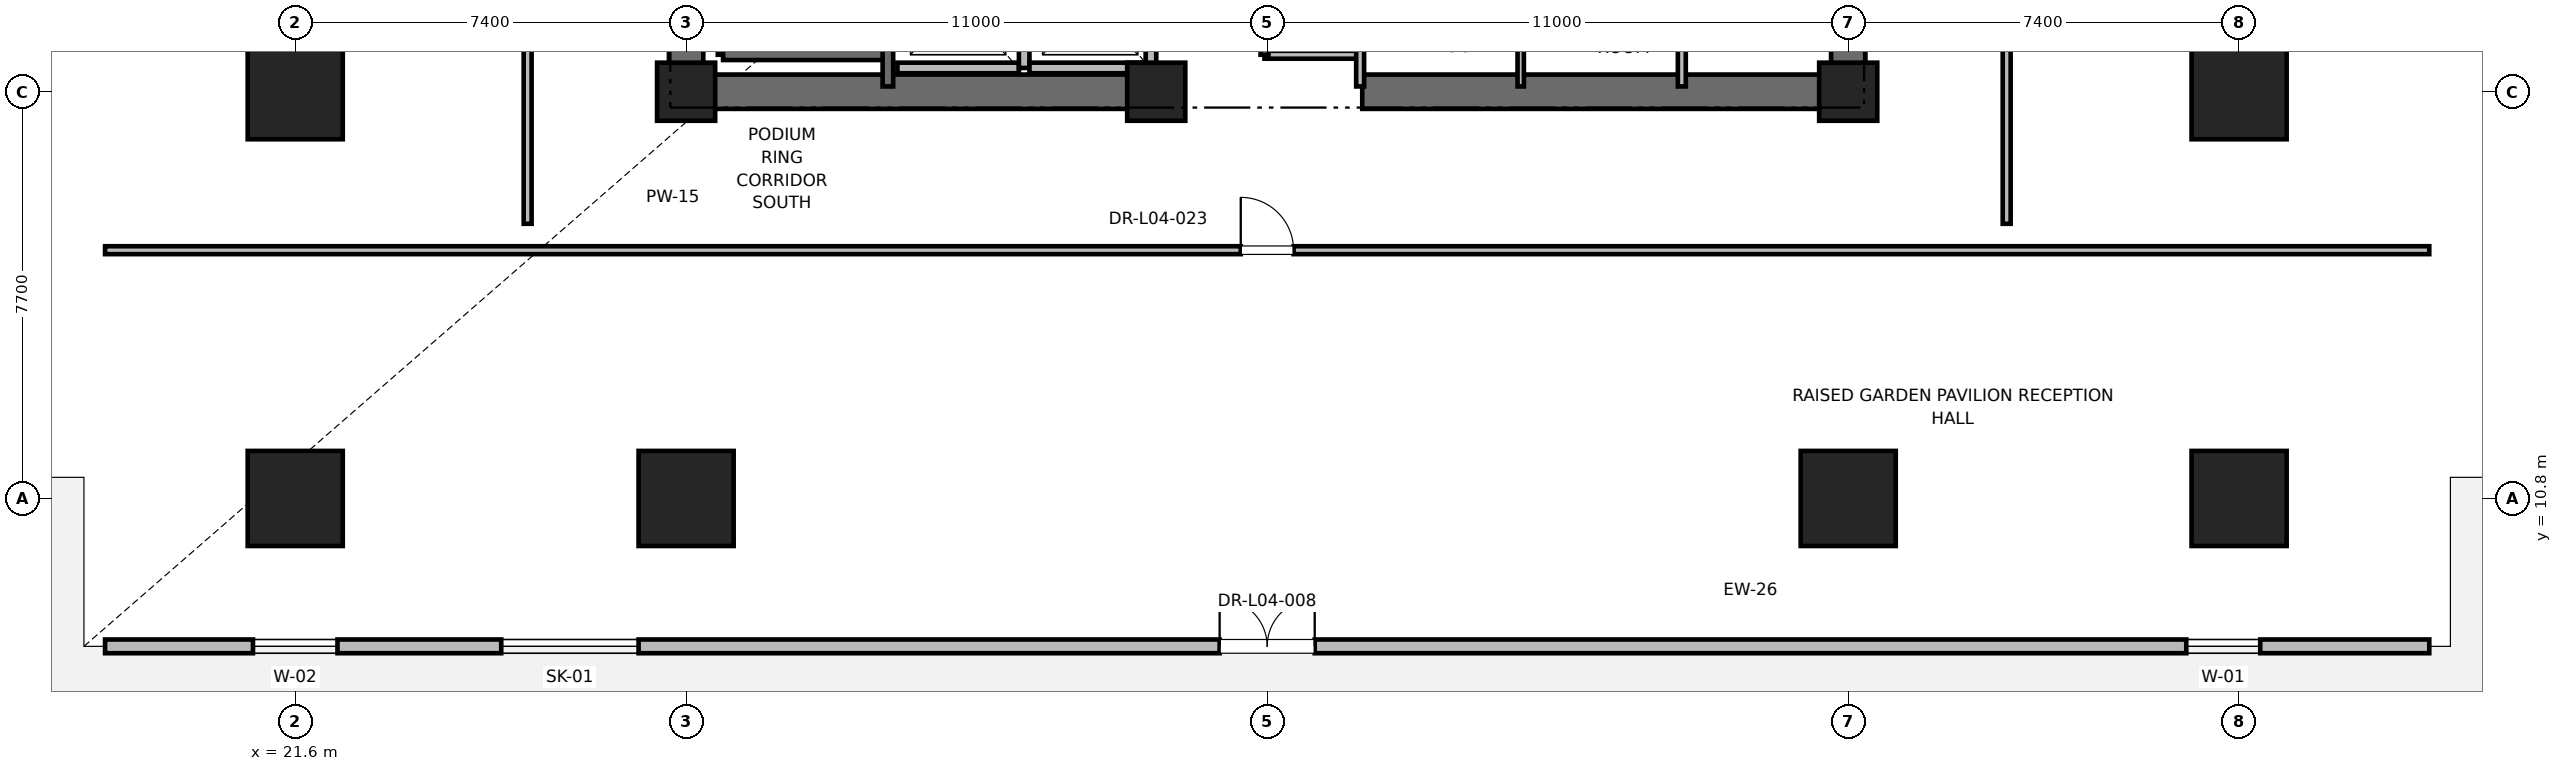
"""IFC4 building model, lengths in metres.
Left out: names, types, materials, properties, quantities, classifications, styles, units other than length and angle.
Written with IfcOpenShell. Run it as: python <this file> out.ifc"""

import sys

from ifc_helpers import new_model, si_unit, direction, frame, frame_2d, origin, origin_2d, place, context, subcontext, project, spatial, rectangle, extrude, element, fill, save


model = new_model("IFC4")
c1 = context("Model", 3, precision=1e-05, world=origin(), true_north=direction((0.0, 1.0)))
c2 = subcontext(c1, "Body", "Model", "MODEL_VIEW")
j1 = project(units=[si_unit("LENGTHUNIT", "METRE"), si_unit("PLANEANGLEUNIT", "RADIAN")], contexts=[c1])
p1 = place(None, origin())
s1 = spatial("IfcSite", under=j1, at=p1, CompositionType="ELEMENT")
p2 = place(p1, origin())
s2 = spatial("IfcBuilding", under=s1, at=p2, CompositionType="ELEMENT")
p3 = place(p2, frame((0.0, 0.0, 21.6)))
s3 = spatial("IfcBuildingStorey", under=s2, at=p3, CompositionType="ELEMENT", Elevation=21.6)
for number, where, z_axis, x_axis in (
    (1, (29.0, 10.8, 0.0), (0.0, 0.0, 1.0), (1.0, 0.0, 0.0)),
    (2, (51.0, 10.8, 0.0), (0.0, 0.0, 1.0), (1.0, 0.0, 0.0)),
    (3, (21.6, 18.5, 0.0), (0.0, 0.0, 1.0), (1.0, 0.0, 0.0)),
    (4, (58.4, 18.5, 0.0), (0.0, 0.0, 1.0), (1.0, 0.0, 0.0)),
    (5, (21.6, 10.8, 0.0), (0.0, 0.0, 1.0), (1.0, 0.0, 0.0)),
    (6, (58.4, 10.8, 0.0), (0.0, 0.0, 1.0), (1.0, 0.0, 0.0)),
):
    element("IfcColumn", number, at=place(p3, frame(where, z_axis=z_axis, x_axis=x_axis)), inside=s3, PredefinedType="COLUMN", context=c2, shape_type="SweptSolid", body=[
        extrude(rectangle(XDim=1.8, YDim=1.8, at=origin_2d()), origin(), (0.0, 0.0, 1.0), 6.0),
    ])
for number, where, z_axis, x_axis in (
    (7, (29.0, 18.5, 0.0), (0.0, 0.0, 1.0), (1.0, 0.0, 0.0)),
    (8, (51.0, 18.5, 0.0), (0.0, 0.0, 1.0), (1.0, 0.0, 0.0)),
    (9, (37.9, 18.5, 0.0), (0.0, 0.0, 1.0), (1.0, 0.0, 0.0)),
):
    element("IfcColumn", number, at=place(p3, frame(where, z_axis=z_axis, x_axis=x_axis)), inside=s3, PredefinedType="PILASTER", context=c2, shape_type="SweptSolid", body=[
        extrude(rectangle(XDim=1.1, YDim=1.1, at=origin_2d()), origin(), (0.0, 0.0, 1.0), 6.0),
    ])
for number, where, z_axis, x_axis in (
    (10, (29.0, 18.5, 0.0), (0.0, 0.0, 1.0), (1.0, 0.0, 0.0)),
    (11, (41.8, 18.5, 0.0), (0.0, 0.0, 1.0), (1.0, 0.0, 0.0)),
):
    element("IfcWall", number, at=place(p3, frame(where, z_axis=z_axis, x_axis=x_axis)), inside=s3, PredefinedType="SHEAR", context=c2, shape_type="SweptSolid", body=[
        extrude(rectangle(XDim=9.2, YDim=0.65, at=frame_2d((4.6, 0.0))), origin(), (0.0, 0.0, 1.0), 5.76),
    ])
p4 = place(p3, frame((29.0, 18.5, 0.0), z_axis=(0.0, 0.0, 1.0), x_axis=(0.0, 1.0, 0.0)))
e12 = element("IfcWall", 12, at=p4, inside=s3, PredefinedType="SHEAR", context=c2, shape_type="SweptSolid", body=[
    extrude(rectangle(XDim=8.8, YDim=0.65, at=frame_2d((4.4, 0.0))), origin(), (0.0, 0.0, 1.0), 5.76),
])
p5 = place(p3, frame((51.0, 18.5, 0.0), z_axis=(0.0, 0.0, 1.0), x_axis=(0.0, 1.0, 0.0)))
e13 = element("IfcWall", 13, at=p5, inside=s3, PredefinedType="SHEAR", context=c2, shape_type="SweptSolid", body=[
    extrude(rectangle(XDim=5.8, YDim=0.65, at=frame_2d((2.9, 0.0))), origin(), (0.0, 0.0, 1.0), 5.76),
])
p6 = place(p3, frame((18.0, 8.0, 0.0), z_axis=(0.0, 0.0, 1.0), x_axis=(1.0, 0.0, 0.0)))
e14 = element("IfcWall", 14, at=p6, inside=s3, PredefinedType="PARAPET", context=c2, shape_type="SweptSolid", body=[
    extrude(rectangle(XDim=44.0, YDim=0.26, at=frame_2d((22.0, 0.0))), origin(), (0.0, 0.0, 1.0), 4.889),
])
p7 = place(p6, frame((2.8, 0.0, 0.9)))
e15 = element("IfcOpeningElement", 15, at=p7, cuts=e14, PredefinedType="OPENING", context=c2, shape_type="SweptSolid", body=[
    extrude(rectangle(XDim=1.6, YDim=2.1, at=frame_2d((0.8, 1.05))), frame((0.0, 0.13, 0.0), z_axis=(0.0, -1.0, 0.0), x_axis=(1.0, 0.0, 0.0)), (0.0, 0.0, 1.0), 0.26),
])
p8 = place(p6, frame((7.5, 0.0, 2.85)))
e16 = element("IfcOpeningElement", 16, at=p8, cuts=e14, PredefinedType="OPENING", context=c2, shape_type="SweptSolid", body=[
    extrude(rectangle(XDim=2.6, YDim=1.4, at=frame_2d((1.3, 0.7))), frame((0.0, 0.13, 0.0), z_axis=(0.0, -1.0, 0.0), x_axis=(1.0, 0.0, 0.0)), (0.0, 0.0, 1.0), 0.26),
])
p9 = place(p6, frame((21.1, 0.0, 0.0)))
e17 = element("IfcOpeningElement", 17, at=p9, cuts=e14, PredefinedType="OPENING", context=c2, shape_type="SweptSolid", body=[
    extrude(rectangle(XDim=1.8, YDim=2.4, at=frame_2d((0.9, 1.2))), frame((0.0, 0.13, 0.0), z_axis=(0.0, -1.0, 0.0), x_axis=(1.0, 0.0, 0.0)), (0.0, 0.0, 1.0), 0.26),
])
p10 = place(p6, frame((39.4, 0.0, 0.95)))
e18 = element("IfcOpeningElement", 18, at=p10, cuts=e14, PredefinedType="OPENING", context=c2, shape_type="SweptSolid", body=[
    extrude(rectangle(XDim=1.4, YDim=2.0, at=frame_2d((0.7, 1.0))), frame((0.0, 0.13, 0.0), z_axis=(0.0, -1.0, 0.0), x_axis=(1.0, 0.0, 0.0)), (0.0, 0.0, 1.0), 0.26),
])
p11 = place(p3, frame((29.7, 19.2, 0.0), z_axis=(0.0, 0.0, 1.0), x_axis=(0.0, 1.0, 0.0)))
e19 = element("IfcWall", 19, at=p11, inside=s3, PredefinedType="SOLIDWALL", context=c2, shape_type="SweptSolid", body=[
    extrude(rectangle(XDim=8.15, YDim=0.2, at=frame_2d((4.075, 0.0))), origin(), (0.0, 0.0, 1.0), 5.76),
])
p12 = place(p3, frame((29.7, 19.2, 0.0), z_axis=(0.0, 0.0, 1.0), x_axis=(1.0, 0.0, 0.0)))
e20 = element("IfcWall", 20, at=p12, inside=s3, PredefinedType="SOLIDWALL", context=c2, shape_type="SweptSolid", body=[
    extrude(rectangle(XDim=3.12, YDim=0.2, at=frame_2d((1.56, 0.0))), origin(), (0.0, 0.0, 1.0), 5.76),
])
p13 = place(p3, frame((32.82, 18.6, 0.0), z_axis=(0.0, 0.0, 1.0), x_axis=(0.0, 1.0, 0.0)))
e21 = element("IfcWall", 21, at=p13, inside=s3, PredefinedType="SOLIDWALL", context=c2, shape_type="SweptSolid", body=[
    extrude(rectangle(XDim=8.78, YDim=0.2, at=frame_2d((4.39, 0.0))), origin(), (0.0, 0.0, 1.0), 5.76),
])
p14 = place(p3, frame((33.0, 18.95, 0.0), z_axis=(0.0, 0.0, 1.0), x_axis=(1.0, 0.0, 0.0)))
e22 = element("IfcWall", 22, at=p14, inside=s3, PredefinedType="SOLIDWALL", context=c2, shape_type="SweptSolid", body=[
    extrude(rectangle(XDim=2.3, YDim=0.2, at=frame_2d((1.15, 0.0))), origin(), (0.0, 0.0, 1.0), 5.76),
])
p15 = place(p3, frame((35.4, 18.95, 0.0), z_axis=(0.0, 0.0, 1.0), x_axis=(0.0, 1.0, 0.0)))
e23 = element("IfcWall", 23, at=p15, inside=s3, PredefinedType="SOLIDWALL", context=c2, shape_type="SweptSolid", body=[
    extrude(rectangle(XDim=2.6, YDim=0.2, at=frame_2d((1.3, 0.0))), origin(), (0.0, 0.0, 1.0), 5.76),
])
p16 = place(p3, frame((35.5, 18.95, 0.0), z_axis=(0.0, 0.0, 1.0), x_axis=(1.0, 0.0, 0.0)))
e24 = element("IfcWall", 24, at=p16, inside=s3, PredefinedType="SOLIDWALL", context=c2, shape_type="SweptSolid", body=[
    extrude(rectangle(XDim=2.3, YDim=0.2, at=frame_2d((1.15, 0.0))), origin(), (0.0, 0.0, 1.0), 4.54),
])
p17 = place(p3, frame((37.8, 18.95, 0.0), z_axis=(0.0, 0.0, 1.0), x_axis=(0.0, 1.0, 0.0)))
e25 = element("IfcWall", 25, at=p17, inside=s3, PredefinedType="SOLIDWALL", context=c2, shape_type="SweptSolid", body=[
    extrude(rectangle(XDim=2.6, YDim=0.2, at=frame_2d((1.3, 0.0))), origin(), (0.0, 0.0, 1.0), 4.54),
])
p18 = place(p3, frame((39.95, 19.2, 0.0), z_axis=(0.0, 0.0, 1.0), x_axis=(1.0, 0.0, 0.0)))
e26 = element("IfcWall", 26, at=p18, inside=s3, PredefinedType="PARTITIONING", context=c2, shape_type="SweptSolid", body=[
    extrude(rectangle(XDim=1.81, YDim=0.15, at=frame_2d((0.905, 0.0))), origin(), (0.0, 0.0, 1.0), 2.85),
])
p19 = place(p3, frame((41.76, 18.6, 0.0), z_axis=(0.0, 0.0, 1.0), x_axis=(0.0, 1.0, 0.0)))
e27 = element("IfcWall", 27, at=p19, inside=s3, PredefinedType="PARTITIONING", context=c2, shape_type="SweptSolid", body=[
    extrude(rectangle(XDim=3.6, YDim=0.15, at=frame_2d((1.8, 0.0))), origin(), (0.0, 0.0, 1.0), 2.85),
])
p20 = place(p3, frame((39.95, 19.2, 0.0), z_axis=(0.0, 0.0, 1.0), x_axis=(0.0, 1.0, 0.0)))
e28 = element("IfcWall", 28, at=p20, inside=s3, PredefinedType="PARTITIONING", context=c2, shape_type="SweptSolid", body=[
    extrude(rectangle(XDim=3.0, YDim=0.15, at=frame_2d((1.5, 0.0))), origin(), (0.0, 0.0, 1.0), 2.85),
])
p21 = place(p20, frame((1.05, 0.0, 0.0)))
e29 = element("IfcOpeningElement", 29, at=p21, cuts=e28, PredefinedType="OPENING", context=c2, shape_type="SweptSolid", body=[
    extrude(rectangle(XDim=0.9, YDim=2.1, at=frame_2d((0.45, 1.05))), frame((0.0, 0.075, 0.0), z_axis=(0.0, -1.0, 0.0), x_axis=(1.0, 0.0, 0.0)), (0.0, 0.0, 1.0), 0.15),
])
p22 = place(p3, frame((47.85, 18.6, 0.0), z_axis=(0.0, 0.0, 1.0), x_axis=(0.0, 1.0, 0.0)))
e30 = element("IfcWall", 30, at=p22, inside=s3, PredefinedType="PARTITIONING", context=c2, shape_type="SweptSolid", body=[
    extrude(rectangle(XDim=2.54, YDim=0.15, at=frame_2d((1.27, 0.0))), origin(), (0.0, 0.0, 1.0), 2.85),
])
p23 = place(p3, frame((44.8, 18.6, 0.0), z_axis=(0.0, 0.0, 1.0), x_axis=(0.0, 1.0, 0.0)))
e31 = element("IfcWall", 31, at=p23, inside=s3, PredefinedType="PARTITIONING", context=c2, shape_type="SweptSolid", body=[
    extrude(rectangle(XDim=3.02, YDim=0.12, at=frame_2d((1.51, 0.0))), origin(), (0.0, 0.0, 1.0), 2.85),
])
p24 = place(p3, frame((18.0, 15.5, 0.0), z_axis=(0.0, 0.0, 1.0), x_axis=(1.0, 0.0, 0.0)))
e32 = element("IfcWall", 32, at=p24, inside=s3, PredefinedType="PARTITIONING", context=c2, shape_type="SweptSolid", body=[
    extrude(rectangle(XDim=44.0, YDim=0.15, at=frame_2d((22.0, 0.0))), origin(), (0.0, 0.0, 1.0), 2.85),
])
p25 = place(p24, frame((21.5, 0.0, 0.0)))
e33 = element("IfcOpeningElement", 33, at=p25, cuts=e32, PredefinedType="OPENING", context=c2, shape_type="SweptSolid", body=[
    extrude(rectangle(XDim=1.0, YDim=2.15, at=frame_2d((0.5, 1.075))), frame((0.0, 0.075, 0.0), z_axis=(0.0, -1.0, 0.0), x_axis=(1.0, 0.0, 0.0)), (0.0, 0.0, 1.0), 0.15),
])
p26 = place(p3, frame((26.0, 16.0, 0.0), z_axis=(0.0, 0.0, 1.0), x_axis=(0.0, 1.0, 0.0)))
e34 = element("IfcWall", 34, at=p26, inside=s3, PredefinedType="PARTITIONING", context=c2, shape_type="SweptSolid", body=[
    extrude(rectangle(XDim=23.0, YDim=0.15, at=frame_2d((11.5, 0.0))), origin(), (0.0, 0.0, 1.0), 2.85),
])
p27 = place(p26, frame((11.0, 0.0, 0.0)))
e35 = element("IfcOpeningElement", 35, at=p27, cuts=e34, PredefinedType="OPENING", context=c2, shape_type="SweptSolid", body=[
    extrude(rectangle(XDim=1.0, YDim=2.15, at=frame_2d((0.5, 1.075))), frame((0.0, 0.075, 0.0), z_axis=(0.0, -1.0, 0.0), x_axis=(1.0, 0.0, 0.0)), (0.0, 0.0, 1.0), 0.15),
])
p28 = place(p3, frame((54.0, 16.0, 0.0), z_axis=(0.0, 0.0, 1.0), x_axis=(0.0, 1.0, 0.0)))
e36 = element("IfcWall", 36, at=p28, inside=s3, PredefinedType="PARTITIONING", context=c2, shape_type="SweptSolid", body=[
    extrude(rectangle(XDim=23.0, YDim=0.15, at=frame_2d((11.5, 0.0))), origin(), (0.0, 0.0, 1.0), 2.85),
])
p29 = place(p28, frame((11.0, 0.0, 0.0)))
e37 = element("IfcOpeningElement", 37, at=p29, cuts=e36, PredefinedType="OPENING", context=c2, shape_type="SweptSolid", body=[
    extrude(rectangle(XDim=1.0, YDim=2.15, at=frame_2d((0.5, 1.075))), frame((0.0, 0.075, 0.0), z_axis=(0.0, -1.0, 0.0), x_axis=(1.0, 0.0, 0.0)), (0.0, 0.0, 1.0), 0.15),
])
p30 = place(p7, origin())
e38 = element("IfcWindow", 38, at=p30, inside=s3, PartitioningType="SINGLE_PANEL", PredefinedType="WINDOW", context=c2, shape_type="SweptSolid", body=[
    extrude(rectangle(XDim=1.6, YDim=2.1, at=frame_2d((0.8, 1.05))), frame((0.0, 0.03, 0.0), z_axis=(0.0, -1.0, 0.0), x_axis=(1.0, 0.0, 0.0)), (0.0, 0.0, 1.0), 0.06),
])
fill(e15, e38)
p31 = place(p8, origin())
e39 = element("IfcWindow", 39, at=p31, inside=s3, PartitioningType="SINGLE_PANEL", PredefinedType="SKYLIGHT", context=c2, shape_type="SweptSolid", body=[
    extrude(rectangle(XDim=2.6, YDim=1.4, at=frame_2d((1.3, 0.7))), frame((0.0, 0.03, 0.0), z_axis=(0.0, -1.0, 0.0), x_axis=(1.0, 0.0, 0.0)), (0.0, 0.0, 1.0), 0.06),
])
fill(e16, e39)
p32 = place(p9, origin())
e40 = element("IfcDoor", 40, at=p32, inside=s3, OperationType="DOUBLE_DOOR_SINGLE_SWING", PredefinedType="DOOR", context=c2, shape_type="SweptSolid", body=[
    extrude(rectangle(XDim=1.8, YDim=2.4, at=frame_2d((0.9, 1.2))), frame((0.0, 0.025, 0.0), z_axis=(0.0, -1.0, 0.0), x_axis=(1.0, 0.0, 0.0)), (0.0, 0.0, 1.0), 0.05),
])
fill(e17, e40)
p33 = place(p10, origin())
e41 = element("IfcWindow", 41, at=p33, inside=s3, PartitioningType="SINGLE_PANEL", PredefinedType="WINDOW", context=c2, shape_type="SweptSolid", body=[
    extrude(rectangle(XDim=1.4, YDim=2.0, at=frame_2d((0.7, 1.0))), frame((0.0, 0.03, 0.0), z_axis=(0.0, -1.0, 0.0), x_axis=(1.0, 0.0, 0.0)), (0.0, 0.0, 1.0), 0.06),
])
fill(e18, e41)
p34 = place(p25, origin())
e42 = element("IfcDoor", 42, at=p34, inside=s3, OperationType="SINGLE_SWING_LEFT", PredefinedType="DOOR", context=c2, shape_type="SweptSolid", body=[
    extrude(rectangle(XDim=1.0, YDim=2.15, at=frame_2d((0.5, 1.075))), frame((0.0, 0.025, 0.0), z_axis=(0.0, -1.0, 0.0), x_axis=(1.0, 0.0, 0.0)), (0.0, 0.0, 1.0), 0.05),
])
fill(e33, e42)
save(model, sys.argv[1])
